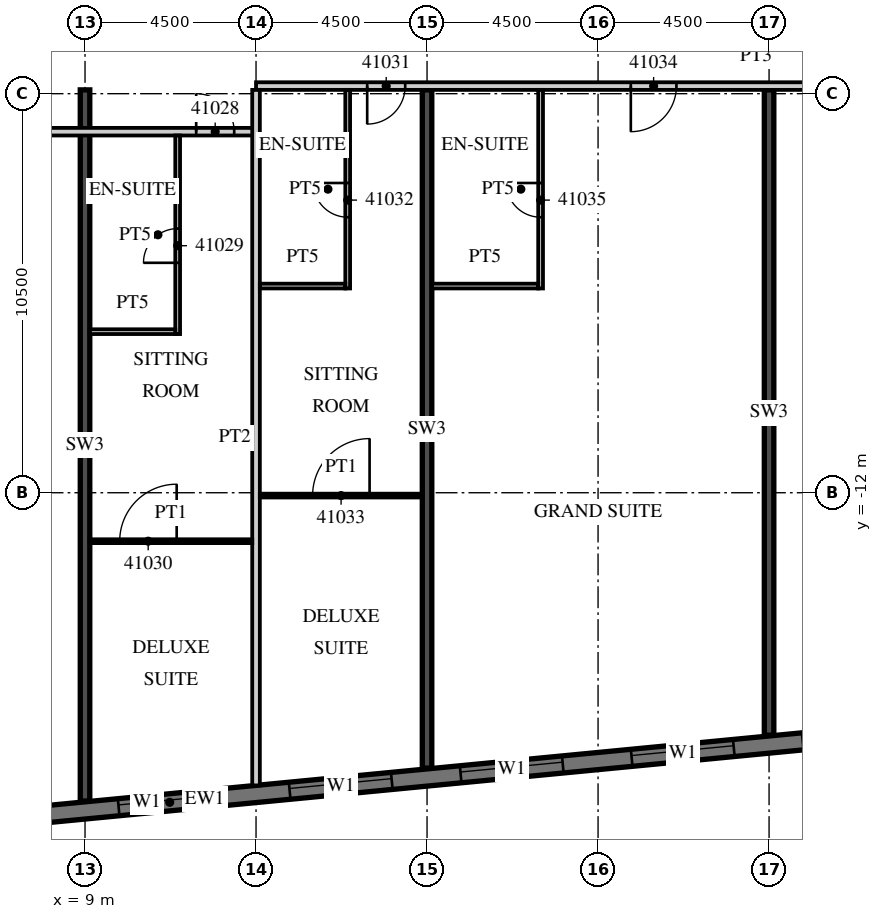
"""IFC4 building model, lengths in metres.
Left out: names, types, materials, properties, quantities, classifications, styles, units other than length and angle.
Written with IfcOpenShell. Run it as: python <this file> out.ifc"""

import sys

from ifc_helpers import new_model, si_unit, direction, frame, frame_2d, origin, place, context, subcontext, project, spatial, rectangle, extrude, element, fill, save


model = new_model("IFC4")
c1 = context("Model", 3, precision=1e-05, world=origin(), true_north=direction((0.0, 1.0)))
c2 = subcontext(c1, "Body", "Model", "MODEL_VIEW")
j1 = project(units=[si_unit("LENGTHUNIT", "METRE"), si_unit("PLANEANGLEUNIT", "RADIAN")], contexts=[c1])
p1 = place(None, origin())
s1 = spatial("IfcSite", under=j1, at=p1, CompositionType="ELEMENT")
p2 = place(p1, origin())
s2 = spatial("IfcBuilding", under=s1, at=p2, CompositionType="ELEMENT")
p3 = place(p2, frame((0.0, 0.0, 176.8)))
s3 = spatial("IfcBuildingStorey", under=s2, at=p3, CompositionType="ELEMENT", Elevation=176.8)
p4 = place(p3, frame((9.0, -20.112, 0.0), z_axis=(0.0, 0.0, 1.0), x_axis=(0.0, 1.0, 0.0)))
e1 = element("IfcWall", 1, at=p4, inside=s3, PredefinedType="SHEAR", context=c2, shape_type="SweptSolid", body=[
    extrude(rectangle(XDim=18.712, YDim=0.25, at=frame_2d((9.356, 0.0))), origin(), (0.0, 0.0, 1.0), 3.3),
])
p5 = place(p3, frame((18.0, -19.245, 0.0), z_axis=(0.0, 0.0, 1.0), x_axis=(0.0, 1.0, 0.0)))
e2 = element("IfcWall", 2, at=p5, inside=s3, PredefinedType="SHEAR", context=c2, shape_type="SweptSolid", body=[
    extrude(rectangle(XDim=17.845, YDim=0.25, at=frame_2d((8.923, 0.0))), origin(), (0.0, 0.0, 1.0), 3.3),
])
p6 = place(p3, frame((27.0, -18.379, 0.0), z_axis=(0.0, 0.0, 1.0), x_axis=(0.0, 1.0, 0.0)))
e3 = element("IfcWall", 3, at=p6, inside=s3, PredefinedType="SHEAR", context=c2, shape_type="SweptSolid", body=[
    extrude(rectangle(XDim=16.979, YDim=0.25, at=frame_2d((8.489, 0.0))), origin(), (0.0, 0.0, 1.0), 3.3),
])
p7 = place(p3, frame((-13.521, -22.529, 0.0), z_axis=(0.0, 0.0, 1.0), x_axis=(0.995396436651, 0.095843277819, 0.0)))
e4 = element("IfcWall", 4, at=p7, inside=s3, PredefinedType="SOLIDWALL", context=c2, shape_type="SweptSolid", body=[
    extrude(rectangle(XDim=51.578, YDim=0.45, at=frame_2d((25.789, 0.0))), origin(), (0.0, 0.0, 1.0), 3.02),
])
p8 = place(p7, frame((0.91, 0.0, 0.45)))
e5 = element("IfcOpeningElement", 5, at=p8, cuts=e4, PredefinedType="OPENING", context=c2, shape_type="SweptSolid", body=[
    extrude(rectangle(XDim=2.7, YDim=2.25, at=frame_2d((1.35, 1.125))), frame((0.0, 0.235, 0.0), z_axis=(0.0, -1.0, 0.0), x_axis=(1.0, 0.0, 0.0)), (0.0, 0.0, 1.0), 0.47),
])
p9 = place(p7, frame((5.431, 0.0, 0.45)))
e6 = element("IfcOpeningElement", 6, at=p9, cuts=e4, PredefinedType="OPENING", context=c2, shape_type="SweptSolid", body=[
    extrude(rectangle(XDim=2.7, YDim=2.25, at=frame_2d((1.35, 1.125))), frame((0.0, 0.235, 0.0), z_axis=(0.0, -1.0, 0.0), x_axis=(1.0, 0.0, 0.0)), (0.0, 0.0, 1.0), 0.47),
])
p10 = place(p7, frame((9.952, 0.0, 0.45)))
e7 = element("IfcOpeningElement", 7, at=p10, cuts=e4, PredefinedType="OPENING", context=c2, shape_type="SweptSolid", body=[
    extrude(rectangle(XDim=2.7, YDim=2.25, at=frame_2d((1.35, 1.125))), frame((0.0, 0.235, 0.0), z_axis=(0.0, -1.0, 0.0), x_axis=(1.0, 0.0, 0.0)), (0.0, 0.0, 1.0), 0.47),
])
p11 = place(p7, frame((14.473, 0.0, 0.45)))
e8 = element("IfcOpeningElement", 8, at=p11, cuts=e4, PredefinedType="OPENING", context=c2, shape_type="SweptSolid", body=[
    extrude(rectangle(XDim=2.7, YDim=2.25, at=frame_2d((1.35, 1.125))), frame((0.0, 0.235, 0.0), z_axis=(0.0, -1.0, 0.0), x_axis=(1.0, 0.0, 0.0)), (0.0, 0.0, 1.0), 0.47),
])
p12 = place(p7, frame((18.994, 0.0, 0.45)))
e9 = element("IfcOpeningElement", 9, at=p12, cuts=e4, PredefinedType="OPENING", context=c2, shape_type="SweptSolid", body=[
    extrude(rectangle(XDim=2.7, YDim=2.25, at=frame_2d((1.35, 1.125))), frame((0.0, 0.235, 0.0), z_axis=(0.0, -1.0, 0.0), x_axis=(1.0, 0.0, 0.0)), (0.0, 0.0, 1.0), 0.47),
])
p13 = place(p7, frame((23.514, 0.0, 0.45)))
e10 = element("IfcOpeningElement", 10, at=p13, cuts=e4, PredefinedType="OPENING", context=c2, shape_type="SweptSolid", body=[
    extrude(rectangle(XDim=2.7, YDim=2.25, at=frame_2d((1.35, 1.125))), frame((0.0, 0.235, 0.0), z_axis=(0.0, -1.0, 0.0), x_axis=(1.0, 0.0, 0.0)), (0.0, 0.0, 1.0), 0.47),
])
p14 = place(p7, frame((28.035, 0.0, 0.45)))
e11 = element("IfcOpeningElement", 11, at=p14, cuts=e4, PredefinedType="OPENING", context=c2, shape_type="SweptSolid", body=[
    extrude(rectangle(XDim=2.7, YDim=2.25, at=frame_2d((1.35, 1.125))), frame((0.0, 0.235, 0.0), z_axis=(0.0, -1.0, 0.0), x_axis=(1.0, 0.0, 0.0)), (0.0, 0.0, 1.0), 0.47),
])
p15 = place(p7, frame((32.556, 0.0, 0.45)))
e12 = element("IfcOpeningElement", 12, at=p15, cuts=e4, PredefinedType="OPENING", context=c2, shape_type="SweptSolid", body=[
    extrude(rectangle(XDim=2.7, YDim=2.25, at=frame_2d((1.35, 1.125))), frame((0.0, 0.235, 0.0), z_axis=(0.0, -1.0, 0.0), x_axis=(1.0, 0.0, 0.0)), (0.0, 0.0, 1.0), 0.47),
])
p16 = place(p7, frame((37.077, 0.0, 0.45)))
e13 = element("IfcOpeningElement", 13, at=p16, cuts=e4, PredefinedType="OPENING", context=c2, shape_type="SweptSolid", body=[
    extrude(rectangle(XDim=2.7, YDim=2.25, at=frame_2d((1.35, 1.125))), frame((0.0, 0.235, 0.0), z_axis=(0.0, -1.0, 0.0), x_axis=(1.0, 0.0, 0.0)), (0.0, 0.0, 1.0), 0.47),
])
p17 = place(p7, frame((41.598, 0.0, 0.45)))
e14 = element("IfcOpeningElement", 14, at=p17, cuts=e4, PredefinedType="OPENING", context=c2, shape_type="SweptSolid", body=[
    extrude(rectangle(XDim=2.7, YDim=2.25, at=frame_2d((1.35, 1.125))), frame((0.0, 0.235, 0.0), z_axis=(0.0, -1.0, 0.0), x_axis=(1.0, 0.0, 0.0)), (0.0, 0.0, 1.0), 0.47),
])
p18 = place(p7, frame((46.119, 0.0, 0.45)))
e15 = element("IfcOpeningElement", 15, at=p18, cuts=e4, PredefinedType="OPENING", context=c2, shape_type="SweptSolid", body=[
    extrude(rectangle(XDim=2.7, YDim=2.25, at=frame_2d((1.35, 1.125))), frame((0.0, 0.235, 0.0), z_axis=(0.0, -1.0, 0.0), x_axis=(1.0, 0.0, 0.0)), (0.0, 0.0, 1.0), 0.47),
])
p19 = place(p3, frame((-13.5, -2.5, 0.0), z_axis=(0.0, 0.0, 1.0), x_axis=(1.0, 0.0, 0.0)))
e16 = element("IfcWall", 16, at=p19, inside=s3, PredefinedType="PARTITIONING", context=c2, shape_type="SweptSolid", body=[
    extrude(rectangle(XDim=27.0, YDim=0.2, at=frame_2d((13.5, 0.0))), origin(), (0.0, 0.0, 1.0), 3.02),
])
p20 = place(p19, frame((2.925, 0.0, 0.0)))
e17 = element("IfcOpeningElement", 17, at=p20, cuts=e16, PredefinedType="OPENING", context=c2, shape_type="SweptSolid", body=[
    extrude(rectangle(XDim=1.0, YDim=2.1, at=frame_2d((0.5, 1.05))), frame((0.0, 0.11, 0.0), z_axis=(0.0, -1.0, 0.0), x_axis=(1.0, 0.0, 0.0)), (0.0, 0.0, 1.0), 0.22),
])
p21 = place(p19, frame((7.45, 0.0, 0.0)))
e18 = element("IfcOpeningElement", 18, at=p21, cuts=e16, PredefinedType="OPENING", context=c2, shape_type="SweptSolid", body=[
    extrude(rectangle(XDim=1.0, YDim=2.1, at=frame_2d((0.5, 1.05))), frame((0.0, 0.11, 0.0), z_axis=(0.0, -1.0, 0.0), x_axis=(1.0, 0.0, 0.0)), (0.0, 0.0, 1.0), 0.22),
])
p22 = place(p19, frame((11.925, 0.0, 0.0)))
e19 = element("IfcOpeningElement", 19, at=p22, cuts=e16, PredefinedType="OPENING", context=c2, shape_type="SweptSolid", body=[
    extrude(rectangle(XDim=1.0, YDim=2.1, at=frame_2d((0.5, 1.05))), frame((0.0, 0.11, 0.0), z_axis=(0.0, -1.0, 0.0), x_axis=(1.0, 0.0, 0.0)), (0.0, 0.0, 1.0), 0.22),
])
p23 = place(p19, frame((18.862, 0.0, 0.0)))
e20 = element("IfcOpeningElement", 20, at=p23, cuts=e16, PredefinedType="OPENING", context=c2, shape_type="SweptSolid", body=[
    extrude(rectangle(XDim=1.2, YDim=2.1, at=frame_2d((0.6, 1.05))), frame((0.0, 0.11, 0.0), z_axis=(0.0, -1.0, 0.0), x_axis=(1.0, 0.0, 0.0)), (0.0, 0.0, 1.0), 0.22),
])
p24 = place(p19, frame((25.425, 0.0, 0.0)))
e21 = element("IfcOpeningElement", 21, at=p24, cuts=e16, PredefinedType="OPENING", context=c2, shape_type="SweptSolid", body=[
    extrude(rectangle(XDim=1.0, YDim=2.1, at=frame_2d((0.5, 1.05))), frame((0.0, 0.11, 0.0), z_axis=(0.0, -1.0, 0.0), x_axis=(1.0, 0.0, 0.0)), (0.0, 0.0, 1.0), 0.22),
])
p25 = place(p3, frame((13.5, -1.3, 0.0), z_axis=(0.0, 0.0, 1.0), x_axis=(1.0, 0.0, 0.0)))
e22 = element("IfcWall", 22, at=p25, inside=s3, PredefinedType="PARTITIONING", context=c2, shape_type="SweptSolid", body=[
    extrude(rectangle(XDim=26.317, YDim=0.2, at=frame_2d((13.158, 0.0))), origin(), (0.0, 0.0, 1.0), 3.02),
])
p26 = place(p25, frame((2.925, 0.0, 0.0)))
e23 = element("IfcOpeningElement", 23, at=p26, cuts=e22, PredefinedType="OPENING", context=c2, shape_type="SweptSolid", body=[
    extrude(rectangle(XDim=1.0, YDim=2.1, at=frame_2d((0.5, 1.05))), frame((0.0, 0.11, 0.0), z_axis=(0.0, -1.0, 0.0), x_axis=(1.0, 0.0, 0.0)), (0.0, 0.0, 1.0), 0.22),
])
p27 = place(p25, frame((9.862, 0.0, 0.0)))
e24 = element("IfcOpeningElement", 24, at=p27, cuts=e22, PredefinedType="OPENING", context=c2, shape_type="SweptSolid", body=[
    extrude(rectangle(XDim=1.2, YDim=2.1, at=frame_2d((0.6, 1.05))), frame((0.0, 0.11, 0.0), z_axis=(0.0, -1.0, 0.0), x_axis=(1.0, 0.0, 0.0)), (0.0, 0.0, 1.0), 0.22),
])
p28 = place(p25, frame((15.938, 0.0, 0.0)))
e25 = element("IfcOpeningElement", 25, at=p28, cuts=e22, PredefinedType="OPENING", context=c2, shape_type="SweptSolid", body=[
    extrude(rectangle(XDim=1.2, YDim=2.1, at=frame_2d((0.6, 1.05))), frame((0.0, 0.11, 0.0), z_axis=(0.0, -1.0, 0.0), x_axis=(1.0, 0.0, 0.0)), (0.0, 0.0, 1.0), 0.22),
])
p29 = place(p25, frame((25.208, 0.0, 0.0)))
e26 = element("IfcOpeningElement", 26, at=p29, cuts=e22, PredefinedType="OPENING", context=c2, shape_type="SweptSolid", body=[
    extrude(rectangle(XDim=0.9, YDim=2.1, at=frame_2d((0.45, 1.05))), frame((0.0, 0.11, 0.0), z_axis=(0.0, -1.0, 0.0), x_axis=(1.0, 0.0, 0.0)), (0.0, 0.0, 1.0), 0.22),
])
p30 = place(p3, frame((13.5, -19.701, 0.0), z_axis=(0.0, 0.0, 1.0), x_axis=(0.0, 1.0, 0.0)))
e27 = element("IfcWall", 27, at=p30, inside=s3, PredefinedType="PARTITIONING", context=c2, shape_type="SweptSolid", body=[
    extrude(rectangle(XDim=18.301, YDim=0.2, at=frame_2d((9.15, 0.0))), origin(), (0.0, 0.0, 1.0), 3.02),
])
p31 = place(p3, frame((11.438, -7.825, 0.0), z_axis=(0.0, 0.0, 1.0), x_axis=(0.0, 1.0, 0.0)))
e28 = element("IfcWall", 28, at=p31, inside=s3, PredefinedType="PARTITIONING", context=c2, shape_type="SweptSolid", body=[
    extrude(rectangle(XDim=5.225, YDim=0.125, at=frame_2d((2.612, 0.0))), origin(), (0.0, 0.0, 1.0), 3.02),
])
p32 = place(p31, frame((1.875, 0.0, 0.0)))
e29 = element("IfcOpeningElement", 29, at=p32, cuts=e28, PredefinedType="OPENING", context=c2, shape_type="SweptSolid", body=[
    extrude(rectangle(XDim=0.9, YDim=2.1, at=frame_2d((0.45, 1.05))), frame((0.0, 0.073, 0.0), z_axis=(0.0, -1.0, 0.0), x_axis=(1.0, 0.0, 0.0)), (0.0, 0.0, 1.0), 0.145),
])
p33 = place(p3, frame((9.125, -7.762, 0.0), z_axis=(0.0, 0.0, 1.0), x_axis=(1.0, 0.0, 0.0)))
e30 = element("IfcWall", 30, at=p33, inside=s3, PredefinedType="PARTITIONING", context=c2, shape_type="SweptSolid", body=[
    extrude(rectangle(XDim=2.25, YDim=0.125, at=frame_2d((1.125, 0.0))), origin(), (0.0, 0.0, 1.0), 3.02),
])
p34 = place(p3, frame((9.125, -13.275, 0.0), z_axis=(0.0, 0.0, 1.0), x_axis=(1.0, 0.0, 0.0)))
e31 = element("IfcWall", 31, at=p34, inside=s3, PredefinedType="PARTITIONING", context=c2, shape_type="SweptSolid", body=[
    extrude(rectangle(XDim=4.275, YDim=0.1, at=frame_2d((2.137, 0.0))), origin(), (0.0, 0.0, 1.0), 3.02),
])
p35 = place(p34, frame((0.787, 0.0, 0.0)))
e32 = element("IfcOpeningElement", 32, at=p35, cuts=e31, PredefinedType="OPENING", context=c2, shape_type="SweptSolid", body=[
    extrude(rectangle(XDim=1.5, YDim=2.1, at=frame_2d((0.75, 1.05))), frame((0.0, 0.06, 0.0), z_axis=(0.0, -1.0, 0.0), x_axis=(1.0, 0.0, 0.0)), (0.0, 0.0, 1.0), 0.12),
])
p36 = place(p3, frame((15.912, -6.625, 0.0), z_axis=(0.0, 0.0, 1.0), x_axis=(0.0, 1.0, 0.0)))
e33 = element("IfcWall", 33, at=p36, inside=s3, PredefinedType="PARTITIONING", context=c2, shape_type="SweptSolid", body=[
    extrude(rectangle(XDim=5.225, YDim=0.125, at=frame_2d((2.613, 0.0))), origin(), (0.0, 0.0, 1.0), 3.02),
])
p37 = place(p36, frame((1.875, 0.0, 0.0)))
e34 = element("IfcOpeningElement", 34, at=p37, cuts=e33, PredefinedType="OPENING", context=c2, shape_type="SweptSolid", body=[
    extrude(rectangle(XDim=0.9, YDim=2.1, at=frame_2d((0.45, 1.05))), frame((0.0, 0.073, 0.0), z_axis=(0.0, -1.0, 0.0), x_axis=(1.0, 0.0, 0.0)), (0.0, 0.0, 1.0), 0.145),
])
p38 = place(p3, frame((13.6, -6.562, 0.0), z_axis=(0.0, 0.0, 1.0), x_axis=(1.0, 0.0, 0.0)))
e35 = element("IfcWall", 35, at=p38, inside=s3, PredefinedType="PARTITIONING", context=c2, shape_type="SweptSolid", body=[
    extrude(rectangle(XDim=2.25, YDim=0.125, at=frame_2d((1.125, 0.0))), origin(), (0.0, 0.0, 1.0), 3.02),
])
p39 = place(p3, frame((13.6, -12.075, 0.0), z_axis=(0.0, 0.0, 1.0), x_axis=(1.0, 0.0, 0.0)))
e36 = element("IfcWall", 36, at=p39, inside=s3, PredefinedType="PARTITIONING", context=c2, shape_type="SweptSolid", body=[
    extrude(rectangle(XDim=4.275, YDim=0.1, at=frame_2d((2.137, 0.0))), origin(), (0.0, 0.0, 1.0), 3.02),
])
p40 = place(p39, frame((1.388, 0.0, 0.0)))
e37 = element("IfcOpeningElement", 37, at=p40, cuts=e36, PredefinedType="OPENING", context=c2, shape_type="SweptSolid", body=[
    extrude(rectangle(XDim=1.5, YDim=2.1, at=frame_2d((0.75, 1.05))), frame((0.0, 0.06, 0.0), z_axis=(0.0, -1.0, 0.0), x_axis=(1.0, 0.0, 0.0)), (0.0, 0.0, 1.0), 0.12),
])
p41 = place(p3, frame((20.988, -6.625, 0.0), z_axis=(0.0, 0.0, 1.0), x_axis=(0.0, 1.0, 0.0)))
e38 = element("IfcWall", 38, at=p41, inside=s3, PredefinedType="PARTITIONING", context=c2, shape_type="SweptSolid", body=[
    extrude(rectangle(XDim=5.225, YDim=0.125, at=frame_2d((2.613, 0.0))), origin(), (0.0, 0.0, 1.0), 3.02),
])
p42 = place(p41, frame((1.875, 0.0, 0.0)))
e39 = element("IfcOpeningElement", 39, at=p42, cuts=e38, PredefinedType="OPENING", context=c2, shape_type="SweptSolid", body=[
    extrude(rectangle(XDim=0.9, YDim=2.1, at=frame_2d((0.45, 1.05))), frame((0.0, 0.073, 0.0), z_axis=(0.0, -1.0, 0.0), x_axis=(1.0, 0.0, 0.0)), (0.0, 0.0, 1.0), 0.145),
])
p43 = place(p3, frame((18.125, -6.562, 0.0), z_axis=(0.0, 0.0, 1.0), x_axis=(1.0, 0.0, 0.0)))
e40 = element("IfcWall", 40, at=p43, inside=s3, PredefinedType="PARTITIONING", context=c2, shape_type="SweptSolid", body=[
    extrude(rectangle(XDim=2.8, YDim=0.125, at=frame_2d((1.4, 0.0))), origin(), (0.0, 0.0, 1.0), 3.02),
])
p44 = place(p13, origin())
e41 = element("IfcWindow", 41, at=p44, inside=s3, PartitioningType="SINGLE_PANEL", PredefinedType="WINDOW", context=c2, shape_type="SweptSolid", body=[
    extrude(rectangle(XDim=2.7, YDim=2.25, at=frame_2d((1.35, 1.125))), frame((0.0, 0.09, 0.0), z_axis=(0.0, -1.0, 0.0), x_axis=(1.0, 0.0, 0.0)), (0.0, 0.0, 1.0), 0.06),
])
fill(e10, e41)
p45 = place(p14, origin())
e42 = element("IfcWindow", 42, at=p45, inside=s3, PartitioningType="SINGLE_PANEL", PredefinedType="WINDOW", context=c2, shape_type="SweptSolid", body=[
    extrude(rectangle(XDim=2.7, YDim=2.25, at=frame_2d((1.35, 1.125))), frame((0.0, 0.09, 0.0), z_axis=(0.0, -1.0, 0.0), x_axis=(1.0, 0.0, 0.0)), (0.0, 0.0, 1.0), 0.06),
])
fill(e11, e42)
p46 = place(p15, origin())
e43 = element("IfcWindow", 43, at=p46, inside=s3, PartitioningType="SINGLE_PANEL", PredefinedType="WINDOW", context=c2, shape_type="SweptSolid", body=[
    extrude(rectangle(XDim=2.7, YDim=2.25, at=frame_2d((1.35, 1.125))), frame((0.0, 0.09, 0.0), z_axis=(0.0, -1.0, 0.0), x_axis=(1.0, 0.0, 0.0)), (0.0, 0.0, 1.0), 0.06),
])
fill(e12, e43)
p47 = place(p16, origin())
e44 = element("IfcWindow", 44, at=p47, inside=s3, PartitioningType="SINGLE_PANEL", PredefinedType="WINDOW", context=c2, shape_type="SweptSolid", body=[
    extrude(rectangle(XDim=2.7, YDim=2.25, at=frame_2d((1.35, 1.125))), frame((0.0, 0.09, 0.0), z_axis=(0.0, -1.0, 0.0), x_axis=(1.0, 0.0, 0.0)), (0.0, 0.0, 1.0), 0.06),
])
fill(e13, e44)
p48 = place(p24, origin())
e45 = element("IfcDoor", 45, at=p48, inside=s3, OperationType="SINGLE_SWING_LEFT", PredefinedType="DOOR", context=c2, shape_type="SweptSolid", body=[
    extrude(rectangle(XDim=1.0, YDim=2.1, at=frame_2d((0.5, 1.05))), frame((0.0, 0.025, 0.0), z_axis=(0.0, -1.0, 0.0), x_axis=(1.0, 0.0, 0.0)), (0.0, 0.0, 1.0), 0.05),
])
fill(e21, e45)
p49 = place(p32, origin())
e46 = element("IfcDoor", 46, at=p49, inside=s3, OperationType="SINGLE_SWING_LEFT", PredefinedType="DOOR", context=c2, shape_type="SweptSolid", body=[
    extrude(rectangle(XDim=0.9, YDim=2.1, at=frame_2d((0.45, 1.05))), frame((0.0, 0.025, 0.0), z_axis=(0.0, -1.0, 0.0), x_axis=(1.0, 0.0, 0.0)), (0.0, 0.0, 1.0), 0.05),
])
fill(e29, e46)
p50 = place(p35, origin())
e47 = element("IfcDoor", 47, at=p50, inside=s3, OperationType="SINGLE_SWING_RIGHT", PredefinedType="DOOR", context=c2, shape_type="SweptSolid", body=[
    extrude(rectangle(XDim=1.5, YDim=2.1, at=frame_2d((0.75, 1.05))), frame((0.0, 0.025, 0.0), z_axis=(0.0, -1.0, 0.0), x_axis=(1.0, 0.0, 0.0)), (0.0, 0.0, 1.0), 0.05),
])
fill(e32, e47)
p51 = place(p26, origin())
e48 = element("IfcDoor", 48, at=p51, inside=s3, OperationType="SINGLE_SWING_LEFT", PredefinedType="DOOR", context=c2, shape_type="SweptSolid", body=[
    extrude(rectangle(XDim=1.0, YDim=2.1, at=frame_2d((0.5, 1.05))), frame((0.0, 0.025, 0.0), z_axis=(0.0, -1.0, 0.0), x_axis=(1.0, 0.0, 0.0)), (0.0, 0.0, 1.0), 0.05),
])
fill(e23, e48)
p52 = place(p37, origin())
e49 = element("IfcDoor", 49, at=p52, inside=s3, OperationType="SINGLE_SWING_RIGHT", PredefinedType="DOOR", context=c2, shape_type="SweptSolid", body=[
    extrude(rectangle(XDim=0.9, YDim=2.1, at=frame_2d((0.45, 1.05))), frame((0.0, 0.025, 0.0), z_axis=(0.0, -1.0, 0.0), x_axis=(1.0, 0.0, 0.0)), (0.0, 0.0, 1.0), 0.05),
])
fill(e34, e49)
p53 = place(p40, origin())
e50 = element("IfcDoor", 50, at=p53, inside=s3, OperationType="SINGLE_SWING_RIGHT", PredefinedType="DOOR", context=c2, shape_type="SweptSolid", body=[
    extrude(rectangle(XDim=1.5, YDim=2.1, at=frame_2d((0.75, 1.05))), frame((0.0, 0.025, 0.0), z_axis=(0.0, -1.0, 0.0), x_axis=(1.0, 0.0, 0.0)), (0.0, 0.0, 1.0), 0.05),
])
fill(e37, e50)
p54 = place(p27, origin())
e51 = element("IfcDoor", 51, at=p54, inside=s3, OperationType="SINGLE_SWING_LEFT", PredefinedType="DOOR", context=c2, shape_type="SweptSolid", body=[
    extrude(rectangle(XDim=1.2, YDim=2.1, at=frame_2d((0.6, 1.05))), frame((0.0, 0.025, 0.0), z_axis=(0.0, -1.0, 0.0), x_axis=(1.0, 0.0, 0.0)), (0.0, 0.0, 1.0), 0.05),
])
fill(e24, e51)
p55 = place(p42, origin())
e52 = element("IfcDoor", 52, at=p55, inside=s3, OperationType="SINGLE_SWING_RIGHT", PredefinedType="DOOR", context=c2, shape_type="SweptSolid", body=[
    extrude(rectangle(XDim=0.9, YDim=2.1, at=frame_2d((0.45, 1.05))), frame((0.0, 0.025, 0.0), z_axis=(0.0, -1.0, 0.0), x_axis=(1.0, 0.0, 0.0)), (0.0, 0.0, 1.0), 0.05),
])
fill(e39, e52)
save(model, sys.argv[1])
